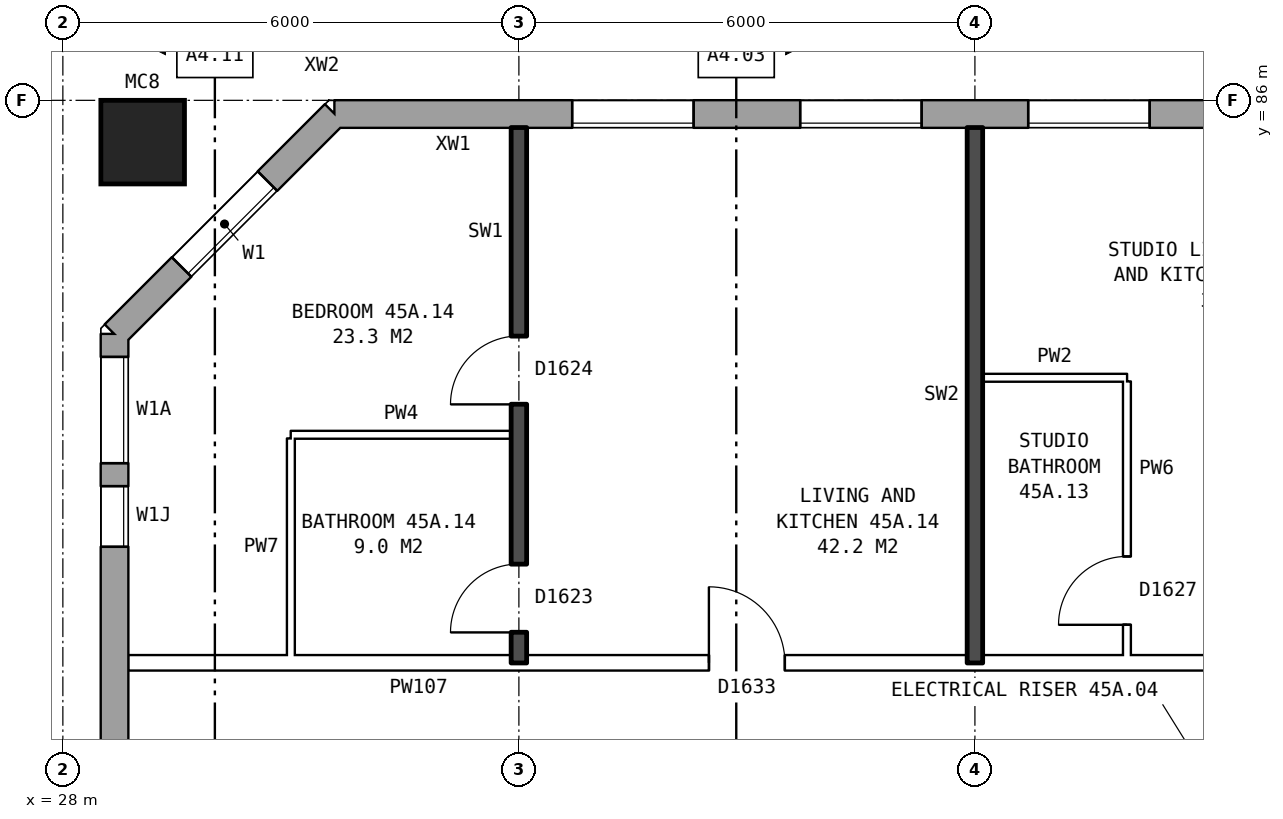
"""IFC4 building model, lengths in metres.
Left out: names, types, materials, properties, quantities, classifications, styles, units other than length and angle.
Written with IfcOpenShell. Run it as: python <this file> out.ifc"""

import sys

from ifc_helpers import new_model, si_unit, direction, frame, frame_2d, origin, origin_2d, place, context, subcontext, project, spatial, rectangle, hollow_rectangle, extrude, element, fill, save


model = new_model("IFC4")
c1 = context("Model", 3, precision=1e-05, world=origin(), true_north=direction((0.0, 1.0)))
c2 = subcontext(c1, "Body", "Model", "MODEL_VIEW")
j1 = project(units=[si_unit("LENGTHUNIT", "METRE"), si_unit("PLANEANGLEUNIT", "RADIAN")], contexts=[c1])
p1 = place(None, origin())
s1 = spatial("IfcSite", under=j1, at=p1, CompositionType="ELEMENT")
p2 = place(p1, origin())
s2 = spatial("IfcBuilding", under=s1, at=p2, CompositionType="ELEMENT")
p3 = place(p2, frame((0.0, 0.0, 160.9)))
s3 = spatial("IfcBuildingStorey", under=s2, at=p3, CompositionType="ELEMENT", Elevation=160.9)
p4 = place(p3, frame((29.05, 85.45, 0.0), z_axis=(0.0, 0.0, 1.0), x_axis=(1.0, 0.0, 0.0)))
e1 = element("IfcColumn", 1, at=p4, inside=s3, PredefinedType="COLUMN", context=c2, shape_type="SweptSolid", body=[
    extrude(hollow_rectangle(XDim=1.1, YDim=1.1, WallThickness=0.06, at=origin_2d()), origin(), (0.0, 0.0, 1.0), 3.1),
])
p5 = place(p3, frame((72.925, 85.82, 0.0), z_axis=(0.0, 0.0, 1.0), x_axis=(-1.0, 0.0, 0.0)))
e2 = element("IfcWall", 2, at=p5, inside=s3, PredefinedType="STANDARD", context=c2, shape_type="SweptSolid", body=[
    extrude(rectangle(XDim=41.351, YDim=0.36, at=frame_2d((20.675, 0.0))), origin(), (0.0, 0.0, 1.0), 2.85),
])
p6 = place(p5, frame((0.625, 0.0, 0.8)))
e3 = element("IfcOpeningElement", 3, at=p6, cuts=e2, PredefinedType="OPENING", context=c2, shape_type="SweptSolid", body=[
    extrude(rectangle(XDim=1.6, YDim=1.8, at=frame_2d((0.8, 0.9))), frame((0.0, 0.19, 0.0), z_axis=(0.0, -1.0, 0.0), x_axis=(1.0, 0.0, 0.0)), (0.0, 0.0, 1.0), 0.38),
])
p7 = place(p5, frame((3.625, 0.0, 0.8)))
e4 = element("IfcOpeningElement", 4, at=p7, cuts=e2, PredefinedType="OPENING", context=c2, shape_type="SweptSolid", body=[
    extrude(rectangle(XDim=1.6, YDim=1.8, at=frame_2d((0.8, 0.9))), frame((0.0, 0.19, 0.0), z_axis=(0.0, -1.0, 0.0), x_axis=(1.0, 0.0, 0.0)), (0.0, 0.0, 1.0), 0.38),
])
p8 = place(p5, frame((6.625, 0.0, 0.8)))
e5 = element("IfcOpeningElement", 5, at=p8, cuts=e2, PredefinedType="OPENING", context=c2, shape_type="SweptSolid", body=[
    extrude(rectangle(XDim=1.6, YDim=1.8, at=frame_2d((0.8, 0.9))), frame((0.0, 0.19, 0.0), z_axis=(0.0, -1.0, 0.0), x_axis=(1.0, 0.0, 0.0)), (0.0, 0.0, 1.0), 0.38),
])
p9 = place(p5, frame((9.625, 0.0, 0.8)))
e6 = element("IfcOpeningElement", 6, at=p9, cuts=e2, PredefinedType="OPENING", context=c2, shape_type="SweptSolid", body=[
    extrude(rectangle(XDim=1.6, YDim=1.8, at=frame_2d((0.8, 0.9))), frame((0.0, 0.19, 0.0), z_axis=(0.0, -1.0, 0.0), x_axis=(1.0, 0.0, 0.0)), (0.0, 0.0, 1.0), 0.38),
])
p10 = place(p5, frame((12.075, 0.0, 0.8)))
e7 = element("IfcOpeningElement", 7, at=p10, cuts=e2, PredefinedType="OPENING", context=c2, shape_type="SweptSolid", body=[
    extrude(rectangle(XDim=1.6, YDim=1.8, at=frame_2d((0.8, 0.9))), frame((0.0, 0.19, 0.0), z_axis=(0.0, -1.0, 0.0), x_axis=(1.0, 0.0, 0.0)), (0.0, 0.0, 1.0), 0.38),
])
p11 = place(p5, frame((15.375, 0.0, 0.25)))
e8 = element("IfcOpeningElement", 8, at=p11, cuts=e2, PredefinedType="OPENING", context=c2, shape_type="SweptSolid", body=[
    extrude(rectangle(XDim=0.8, YDim=0.9, at=frame_2d((0.4, 0.45))), frame((0.0, 0.19, 0.0), z_axis=(0.0, -1.0, 0.0), x_axis=(1.0, 0.0, 0.0)), (0.0, 0.0, 1.0), 0.38),
])
p12 = place(p5, frame((18.625, 0.0, 0.8)))
e9 = element("IfcOpeningElement", 9, at=p12, cuts=e2, PredefinedType="OPENING", context=c2, shape_type="SweptSolid", body=[
    extrude(rectangle(XDim=1.6, YDim=1.8, at=frame_2d((0.8, 0.9))), frame((0.0, 0.19, 0.0), z_axis=(0.0, -1.0, 0.0), x_axis=(1.0, 0.0, 0.0)), (0.0, 0.0, 1.0), 0.38),
])
p13 = place(p5, frame((21.625, 0.0, 0.8)))
e10 = element("IfcOpeningElement", 10, at=p13, cuts=e2, PredefinedType="OPENING", context=c2, shape_type="SweptSolid", body=[
    extrude(rectangle(XDim=1.6, YDim=1.8, at=frame_2d((0.8, 0.9))), frame((0.0, 0.19, 0.0), z_axis=(0.0, -1.0, 0.0), x_axis=(1.0, 0.0, 0.0)), (0.0, 0.0, 1.0), 0.38),
])
p14 = place(p5, frame((24.075, 0.0, 0.35)))
e11 = element("IfcOpeningElement", 11, at=p14, cuts=e2, PredefinedType="OPENING", context=c2, shape_type="SweptSolid", body=[
    extrude(rectangle(XDim=1.0, YDim=1.5, at=frame_2d((0.5, 0.75))), frame((0.0, 0.19, 0.0), z_axis=(0.0, -1.0, 0.0), x_axis=(1.0, 0.0, 0.0)), (0.0, 0.0, 1.0), 0.38),
])
p15 = place(p5, frame((27.625, 0.0, 0.8)))
e12 = element("IfcOpeningElement", 12, at=p15, cuts=e2, PredefinedType="OPENING", context=c2, shape_type="SweptSolid", body=[
    extrude(rectangle(XDim=1.6, YDim=1.8, at=frame_2d((0.8, 0.9))), frame((0.0, 0.19, 0.0), z_axis=(0.0, -1.0, 0.0), x_axis=(1.0, 0.0, 0.0)), (0.0, 0.0, 1.0), 0.38),
])
p16 = place(p5, frame((30.625, 0.0, 0.8)))
e13 = element("IfcOpeningElement", 13, at=p16, cuts=e2, PredefinedType="OPENING", context=c2, shape_type="SweptSolid", body=[
    extrude(rectangle(XDim=1.6, YDim=1.8, at=frame_2d((0.8, 0.9))), frame((0.0, 0.19, 0.0), z_axis=(0.0, -1.0, 0.0), x_axis=(1.0, 0.0, 0.0)), (0.0, 0.0, 1.0), 0.38),
])
p17 = place(p5, frame((33.625, 0.0, 0.8)))
e14 = element("IfcOpeningElement", 14, at=p17, cuts=e2, PredefinedType="OPENING", context=c2, shape_type="SweptSolid", body=[
    extrude(rectangle(XDim=1.6, YDim=1.8, at=frame_2d((0.8, 0.9))), frame((0.0, 0.19, 0.0), z_axis=(0.0, -1.0, 0.0), x_axis=(1.0, 0.0, 0.0)), (0.0, 0.0, 1.0), 0.38),
])
p18 = place(p5, frame((36.625, 0.0, 0.8)))
e15 = element("IfcOpeningElement", 15, at=p18, cuts=e2, PredefinedType="OPENING", context=c2, shape_type="SweptSolid", body=[
    extrude(rectangle(XDim=1.6, YDim=1.8, at=frame_2d((0.8, 0.9))), frame((0.0, 0.19, 0.0), z_axis=(0.0, -1.0, 0.0), x_axis=(1.0, 0.0, 0.0)), (0.0, 0.0, 1.0), 0.38),
])
p19 = place(p5, frame((13.975, 0.0, 1.5)))
e16 = element("IfcOpeningElement", 16, at=p19, cuts=e2, PredefinedType="OPENING", context=c2, shape_type="SweptSolid", body=[
    extrude(rectangle(XDim=0.6, YDim=0.9, at=frame_2d((0.3, 0.45))), frame((0.0, 0.19, 0.0), z_axis=(0.0, -1.0, 0.0), x_axis=(1.0, 0.0, 0.0)), (0.0, 0.0, 1.0), 0.38),
])
p20 = place(p5, frame((16.525, 0.0, 0.25)))
e17 = element("IfcOpeningElement", 17, at=p20, cuts=e2, PredefinedType="OPENING", context=c2, shape_type="SweptSolid", body=[
    extrude(rectangle(XDim=1.2, YDim=1.8, at=frame_2d((0.6, 0.9))), frame((0.0, 0.19, 0.0), z_axis=(0.0, -1.0, 0.0), x_axis=(1.0, 0.0, 0.0)), (0.0, 0.0, 1.0), 0.38),
])
p21 = place(p5, frame((25.375, 0.0, 0.25)))
e18 = element("IfcOpeningElement", 18, at=p21, cuts=e2, PredefinedType="OPENING", context=c2, shape_type="SweptSolid", body=[
    extrude(rectangle(XDim=0.6, YDim=0.9, at=frame_2d((0.3, 0.45))), frame((0.0, 0.19, 0.0), z_axis=(0.0, -1.0, 0.0), x_axis=(1.0, 0.0, 0.0)), (0.0, 0.0, 1.0), 0.38),
])
p22 = place(p3, frame((31.575, 85.82, 0.0), z_axis=(0.0, 0.0, 1.0), x_axis=(-0.707106781187, -0.707106781187, 0.0)))
e19 = element("IfcWall", 19, at=p22, inside=s3, PredefinedType="STANDARD", context=c2, shape_type="SweptSolid", body=[
    extrude(rectangle(XDim=4.094, YDim=0.36, at=frame_2d((2.047, 0.0))), origin(), (0.0, 0.0, 1.0), 2.85),
])
p23 = place(p22, frame((1.247, 0.0, 0.8)))
e20 = element("IfcOpeningElement", 20, at=p23, cuts=e19, PredefinedType="OPENING", context=c2, shape_type="SweptSolid", body=[
    extrude(rectangle(XDim=1.6, YDim=1.8, at=frame_2d((0.8, 0.9))), frame((0.0, 0.19, 0.0), z_axis=(0.0, -1.0, 0.0), x_axis=(1.0, 0.0, 0.0)), (0.0, 0.0, 1.0), 0.38),
])
p24 = place(p3, frame((28.68, 82.925, 0.0), z_axis=(0.0, 0.0, 1.0), x_axis=(0.0, -1.0, 0.0)))
e21 = element("IfcWall", 21, at=p24, inside=s3, PredefinedType="STANDARD", context=c2, shape_type="SweptSolid", body=[
    extrude(rectangle(XDim=25.851, YDim=0.36, at=frame_2d((12.925, 0.0))), origin(), (0.0, 0.0, 1.0), 2.85),
])
p25 = place(p24, frame((0.3, 0.0, 0.8)))
e22 = element("IfcOpeningElement", 22, at=p25, cuts=e21, PredefinedType="OPENING", context=c2, shape_type="SweptSolid", body=[
    extrude(rectangle(XDim=1.4, YDim=1.8, at=frame_2d((0.7, 0.9))), frame((0.0, 0.19, 0.0), z_axis=(0.0, -1.0, 0.0), x_axis=(1.0, 0.0, 0.0)), (0.0, 0.0, 1.0), 0.38),
])
p26 = place(p24, frame((5.475, 0.0, 1.4)))
e23 = element("IfcOpeningElement", 23, at=p26, cuts=e21, PredefinedType="OPENING", context=c2, shape_type="SweptSolid", body=[
    extrude(rectangle(XDim=1.4, YDim=1.2, at=frame_2d((0.7, 0.6))), frame((0.0, 0.19, 0.0), z_axis=(0.0, -1.0, 0.0), x_axis=(1.0, 0.0, 0.0)), (0.0, 0.0, 1.0), 0.38),
])
p27 = place(p24, frame((7.625, 0.0, 0.8)))
e24 = element("IfcOpeningElement", 24, at=p27, cuts=e21, PredefinedType="OPENING", context=c2, shape_type="SweptSolid", body=[
    extrude(rectangle(XDim=1.6, YDim=1.8, at=frame_2d((0.8, 0.9))), frame((0.0, 0.19, 0.0), z_axis=(0.0, -1.0, 0.0), x_axis=(1.0, 0.0, 0.0)), (0.0, 0.0, 1.0), 0.38),
])
p28 = place(p24, frame((10.625, 0.0, 0.8)))
e25 = element("IfcOpeningElement", 25, at=p28, cuts=e21, PredefinedType="OPENING", context=c2, shape_type="SweptSolid", body=[
    extrude(rectangle(XDim=1.6, YDim=1.8, at=frame_2d((0.8, 0.9))), frame((0.0, 0.19, 0.0), z_axis=(0.0, -1.0, 0.0), x_axis=(1.0, 0.0, 0.0)), (0.0, 0.0, 1.0), 0.38),
])
p29 = place(p24, frame((13.625, 0.0, 0.8)))
e26 = element("IfcOpeningElement", 26, at=p29, cuts=e21, PredefinedType="OPENING", context=c2, shape_type="SweptSolid", body=[
    extrude(rectangle(XDim=1.6, YDim=1.8, at=frame_2d((0.8, 0.9))), frame((0.0, 0.19, 0.0), z_axis=(0.0, -1.0, 0.0), x_axis=(1.0, 0.0, 0.0)), (0.0, 0.0, 1.0), 0.38),
])
p30 = place(p24, frame((16.625, 0.0, 0.8)))
e27 = element("IfcOpeningElement", 27, at=p30, cuts=e21, PredefinedType="OPENING", context=c2, shape_type="SweptSolid", body=[
    extrude(rectangle(XDim=1.6, YDim=1.8, at=frame_2d((0.8, 0.9))), frame((0.0, 0.19, 0.0), z_axis=(0.0, -1.0, 0.0), x_axis=(1.0, 0.0, 0.0)), (0.0, 0.0, 1.0), 0.38),
])
p31 = place(p24, frame((9.525, 0.0, 0.8)))
e28 = element("IfcOpeningElement", 28, at=p31, cuts=e21, PredefinedType="OPENING", context=c2, shape_type="SweptSolid", body=[
    extrude(rectangle(XDim=0.8, YDim=1.8, at=frame_2d((0.4, 0.9))), frame((0.0, 0.19, 0.0), z_axis=(0.0, -1.0, 0.0), x_axis=(1.0, 0.0, 0.0)), (0.0, 0.0, 1.0), 0.38),
])
p32 = place(p24, frame((22.425, 0.0, 0.8)))
e29 = element("IfcOpeningElement", 29, at=p32, cuts=e21, PredefinedType="OPENING", context=c2, shape_type="SweptSolid", body=[
    extrude(rectangle(XDim=1.0, YDim=1.2, at=frame_2d((0.5, 0.6))), frame((0.0, 0.19, 0.0), z_axis=(0.0, -1.0, 0.0), x_axis=(1.0, 0.0, 0.0)), (0.0, 0.0, 1.0), 0.38),
])
p33 = place(p24, frame((2.0, 0.0, 0.8)))
e30 = element("IfcOpeningElement", 30, at=p33, cuts=e21, PredefinedType="OPENING", context=c2, shape_type="SweptSolid", body=[
    extrude(rectangle(XDim=0.8, YDim=1.5, at=frame_2d((0.4, 0.75))), frame((0.0, 0.19, 0.0), z_axis=(0.0, -1.0, 0.0), x_axis=(1.0, 0.0, 0.0)), (0.0, 0.0, 1.0), 0.38),
])
p34 = place(p24, frame((12.525, 0.0, 0.8)))
e31 = element("IfcOpeningElement", 31, at=p34, cuts=e21, PredefinedType="OPENING", context=c2, shape_type="SweptSolid", body=[
    extrude(rectangle(XDim=0.8, YDim=1.8, at=frame_2d((0.4, 0.9))), frame((0.0, 0.19, 0.0), z_axis=(0.0, -1.0, 0.0), x_axis=(1.0, 0.0, 0.0)), (0.0, 0.0, 1.0), 0.38),
])
p35 = place(p24, frame((15.525, 0.0, 0.8)))
e32 = element("IfcOpeningElement", 32, at=p35, cuts=e21, PredefinedType="OPENING", context=c2, shape_type="SweptSolid", body=[
    extrude(rectangle(XDim=0.8, YDim=1.8, at=frame_2d((0.4, 0.9))), frame((0.0, 0.19, 0.0), z_axis=(0.0, -1.0, 0.0), x_axis=(1.0, 0.0, 0.0)), (0.0, 0.0, 1.0), 0.38),
])
p36 = place(p24, frame((18.525, 0.0, 0.8)))
e33 = element("IfcOpeningElement", 33, at=p36, cuts=e21, PredefinedType="OPENING", context=c2, shape_type="SweptSolid", body=[
    extrude(rectangle(XDim=0.8, YDim=1.8, at=frame_2d((0.4, 0.9))), frame((0.0, 0.19, 0.0), z_axis=(0.0, -1.0, 0.0), x_axis=(1.0, 0.0, 0.0)), (0.0, 0.0, 1.0), 0.38),
])
p37 = place(p24, frame((23.725, 0.0, 0.8)))
e34 = element("IfcOpeningElement", 34, at=p37, cuts=e21, PredefinedType="OPENING", context=c2, shape_type="SweptSolid", body=[
    extrude(rectangle(XDim=1.4, YDim=1.8, at=frame_2d((0.7, 0.9))), frame((0.0, 0.19, 0.0), z_axis=(0.0, -1.0, 0.0), x_axis=(1.0, 0.0, 0.0)), (0.0, 0.0, 1.0), 0.38),
])
p38 = place(p3, frame((28.86, 78.6, 0.0), z_axis=(0.0, 0.0, 1.0), x_axis=(1.0, 0.0, 0.0)))
e35 = element("IfcWall", 35, at=p38, inside=s3, PredefinedType="PARTITIONING", context=c2, shape_type="SweptSolid", body=[
    extrude(rectangle(XDim=17.04, YDim=0.2, at=frame_2d((8.52, 0.0))), origin(), (0.0, 0.0, 1.0), 2.85),
])
p39 = place(p38, frame((14.59, 0.0, 0.0)))
e36 = element("IfcOpeningElement", 36, at=p39, cuts=e35, PredefinedType="OPENING", context=c2, shape_type="SweptSolid", body=[
    extrude(rectangle(XDim=1.0, YDim=2.1, at=frame_2d((0.5, 1.05))), frame((0.0, 0.11, 0.0), z_axis=(0.0, -1.0, 0.0), x_axis=(1.0, 0.0, 0.0)), (0.0, 0.0, 1.0), 0.22),
])
p40 = place(p38, frame((7.64, 0.0, 0.0)))
e37 = element("IfcOpeningElement", 37, at=p40, cuts=e35, PredefinedType="OPENING", context=c2, shape_type="SweptSolid", body=[
    extrude(rectangle(XDim=1.0, YDim=2.1, at=frame_2d((0.5, 1.05))), frame((0.0, 0.11, 0.0), z_axis=(0.0, -1.0, 0.0), x_axis=(1.0, 0.0, 0.0)), (0.0, 0.0, 1.0), 0.22),
])
p41 = place(p3, frame((31.0, 81.6, 0.0), z_axis=(0.0, 0.0, 1.0), x_axis=(1.0, 0.0, 0.0)))
e38 = element("IfcWall", 38, at=p41, inside=s3, PredefinedType="PARTITIONING", context=c2, shape_type="SweptSolid", body=[
    extrude(rectangle(XDim=2.9, YDim=0.1, at=frame_2d((1.45, 0.0))), origin(), (0.0, 0.0, 1.0), 2.85),
])
p42 = place(p3, frame((40.1, 82.35, 0.0), z_axis=(0.0, 0.0, 1.0), x_axis=(1.0, 0.0, 0.0)))
e39 = element("IfcWall", 39, at=p42, inside=s3, PredefinedType="PARTITIONING", context=c2, shape_type="SweptSolid", body=[
    extrude(rectangle(XDim=1.9, YDim=0.1, at=frame_2d((0.95, 0.0))), origin(), (0.0, 0.0, 1.0), 2.85),
])
p43 = place(p3, frame((31.0, 78.7, 0.0), z_axis=(0.0, 0.0, 1.0), x_axis=(0.0, 1.0, 0.0)))
e40 = element("IfcWall", 40, at=p43, inside=s3, PredefinedType="PARTITIONING", context=c2, shape_type="SweptSolid", body=[
    extrude(rectangle(XDim=2.85, YDim=0.1, at=frame_2d((1.425, 0.0))), origin(), (0.0, 0.0, 1.0), 2.85),
])
p44 = place(p3, frame((34.0, 78.6, 0.0), z_axis=(0.0, 0.0, 1.0), x_axis=(0.0, 1.0, 0.0)))
e41 = element("IfcWall", 41, at=p44, inside=s3, PredefinedType="SOLIDWALL", context=c2, shape_type="SweptSolid", body=[
    extrude(rectangle(XDim=7.04, YDim=0.2, at=frame_2d((3.52, 0.0))), origin(), (0.0, 0.0, 1.0), 2.85),
])
p45 = place(p44, frame((3.4, 0.0, 0.0)))
e42 = element("IfcOpeningElement", 42, at=p45, cuts=e41, PredefinedType="OPENING", context=c2, shape_type="SweptSolid", body=[
    extrude(rectangle(XDim=0.9, YDim=2.1, at=frame_2d((0.45, 1.05))), frame((0.0, 0.11, 0.0), z_axis=(0.0, -1.0, 0.0), x_axis=(1.0, 0.0, 0.0)), (0.0, 0.0, 1.0), 0.22),
])
p46 = place(p44, frame((0.4, 0.0, 0.0)))
e43 = element("IfcOpeningElement", 43, at=p46, cuts=e41, PredefinedType="OPENING", context=c2, shape_type="SweptSolid", body=[
    extrude(rectangle(XDim=0.9, YDim=2.1, at=frame_2d((0.45, 1.05))), frame((0.0, 0.11, 0.0), z_axis=(0.0, -1.0, 0.0), x_axis=(1.0, 0.0, 0.0)), (0.0, 0.0, 1.0), 0.22),
])
p47 = place(p3, frame((40.0, 78.6, 0.0), z_axis=(0.0, 0.0, 1.0), x_axis=(0.0, 1.0, 0.0)))
e44 = element("IfcWall", 44, at=p47, inside=s3, PredefinedType="SOLIDWALL", context=c2, shape_type="SweptSolid", body=[
    extrude(rectangle(XDim=7.04, YDim=0.2, at=frame_2d((3.52, 0.0))), origin(), (0.0, 0.0, 1.0), 2.85),
])
p48 = place(p3, frame((42.0, 78.7, 0.0), z_axis=(0.0, 0.0, 1.0), x_axis=(0.0, 1.0, 0.0)))
e45 = element("IfcWall", 45, at=p48, inside=s3, PredefinedType="PARTITIONING", context=c2, shape_type="SweptSolid", body=[
    extrude(rectangle(XDim=3.6, YDim=0.1, at=frame_2d((1.8, 0.0))), origin(), (0.0, 0.0, 1.0), 2.85),
])
p49 = place(p48, frame((0.4, 0.0, 0.0)))
e46 = element("IfcOpeningElement", 46, at=p49, cuts=e45, PredefinedType="OPENING", context=c2, shape_type="SweptSolid", body=[
    extrude(rectangle(XDim=0.9, YDim=2.1, at=frame_2d((0.45, 1.05))), frame((0.0, 0.06, 0.0), z_axis=(0.0, -1.0, 0.0), x_axis=(1.0, 0.0, 0.0)), (0.0, 0.0, 1.0), 0.12),
])
p50 = place(p16, origin())
e47 = element("IfcWindow", 47, at=p50, inside=s3, PartitioningType="SINGLE_PANEL", PredefinedType="WINDOW", context=c2, shape_type="SweptSolid", body=[
    extrude(rectangle(XDim=1.6, YDim=1.8, at=frame_2d((0.8, 0.9))), frame((0.0, 0.15, 0.0), z_axis=(0.0, -1.0, 0.0), x_axis=(1.0, 0.0, 0.0)), (0.0, 0.0, 1.0), 0.06),
])
fill(e13, e47)
p51 = place(p17, origin())
e48 = element("IfcWindow", 48, at=p51, inside=s3, PartitioningType="SINGLE_PANEL", PredefinedType="WINDOW", context=c2, shape_type="SweptSolid", body=[
    extrude(rectangle(XDim=1.6, YDim=1.8, at=frame_2d((0.8, 0.9))), frame((0.0, 0.15, 0.0), z_axis=(0.0, -1.0, 0.0), x_axis=(1.0, 0.0, 0.0)), (0.0, 0.0, 1.0), 0.06),
])
fill(e14, e48)
p52 = place(p18, origin())
e49 = element("IfcWindow", 49, at=p52, inside=s3, PartitioningType="SINGLE_PANEL", PredefinedType="WINDOW", context=c2, shape_type="SweptSolid", body=[
    extrude(rectangle(XDim=1.6, YDim=1.8, at=frame_2d((0.8, 0.9))), frame((0.0, 0.15, 0.0), z_axis=(0.0, -1.0, 0.0), x_axis=(1.0, 0.0, 0.0)), (0.0, 0.0, 1.0), 0.06),
])
fill(e15, e49)
p53 = place(p23, origin())
e50 = element("IfcWindow", 50, at=p53, inside=s3, PartitioningType="SINGLE_PANEL", PredefinedType="WINDOW", context=c2, shape_type="SweptSolid", body=[
    extrude(rectangle(XDim=1.6, YDim=1.8, at=frame_2d((0.8, 0.9))), frame((0.0, 0.15, 0.0), z_axis=(0.0, -1.0, 0.0), x_axis=(1.0, 0.0, 0.0)), (0.0, 0.0, 1.0), 0.06),
])
fill(e20, e50)
p54 = place(p25, origin())
e51 = element("IfcWindow", 51, at=p54, inside=s3, PartitioningType="SINGLE_PANEL", PredefinedType="WINDOW", context=c2, shape_type="SweptSolid", body=[
    extrude(rectangle(XDim=1.4, YDim=1.8, at=frame_2d((0.7, 0.9))), frame((0.0, 0.15, 0.0), z_axis=(0.0, -1.0, 0.0), x_axis=(1.0, 0.0, 0.0)), (0.0, 0.0, 1.0), 0.06),
])
fill(e22, e51)
p55 = place(p49, origin())
e52 = element("IfcDoor", 52, at=p55, inside=s3, OperationType="SINGLE_SWING_LEFT", PredefinedType="DOOR", context=c2, shape_type="SweptSolid", body=[
    extrude(rectangle(XDim=0.9, YDim=2.1, at=frame_2d((0.45, 1.05))), frame((0.0, 0.025, 0.0), z_axis=(0.0, -1.0, 0.0), x_axis=(1.0, 0.0, 0.0)), (0.0, 0.0, 1.0), 0.05),
])
fill(e46, e52)
p56 = place(p45, origin())
e53 = element("IfcDoor", 53, at=p56, inside=s3, OperationType="SINGLE_SWING_LEFT", PredefinedType="DOOR", context=c2, shape_type="SweptSolid", body=[
    extrude(rectangle(XDim=0.9, YDim=2.1, at=frame_2d((0.45, 1.05))), frame((0.0, 0.025, 0.0), z_axis=(0.0, -1.0, 0.0), x_axis=(1.0, 0.0, 0.0)), (0.0, 0.0, 1.0), 0.05),
])
fill(e42, e53)
p57 = place(p40, origin())
e54 = element("IfcDoor", 54, at=p57, inside=s3, OperationType="SINGLE_SWING_LEFT", PredefinedType="DOOR", context=c2, shape_type="SweptSolid", body=[
    extrude(rectangle(XDim=1.0, YDim=2.1, at=frame_2d((0.5, 1.05))), frame((0.0, 0.025, 0.0), z_axis=(0.0, -1.0, 0.0), x_axis=(1.0, 0.0, 0.0)), (0.0, 0.0, 1.0), 0.05),
])
fill(e37, e54)
p58 = place(p46, origin())
e55 = element("IfcDoor", 55, at=p58, inside=s3, OperationType="SINGLE_SWING_LEFT", PredefinedType="DOOR", context=c2, shape_type="SweptSolid", body=[
    extrude(rectangle(XDim=0.9, YDim=2.1, at=frame_2d((0.45, 1.05))), frame((0.0, 0.025, 0.0), z_axis=(0.0, -1.0, 0.0), x_axis=(1.0, 0.0, 0.0)), (0.0, 0.0, 1.0), 0.05),
])
fill(e43, e55)
p59 = place(p33, origin())
e56 = element("IfcWindow", 56, at=p59, inside=s3, PartitioningType="SINGLE_PANEL", PredefinedType="WINDOW", context=c2, shape_type="SweptSolid", body=[
    extrude(rectangle(XDim=0.8, YDim=1.5, at=frame_2d((0.4, 0.75))), frame((0.0, 0.15, 0.0), z_axis=(0.0, -1.0, 0.0), x_axis=(1.0, 0.0, 0.0)), (0.0, 0.0, 1.0), 0.06),
])
fill(e30, e56)
save(model, sys.argv[1])
